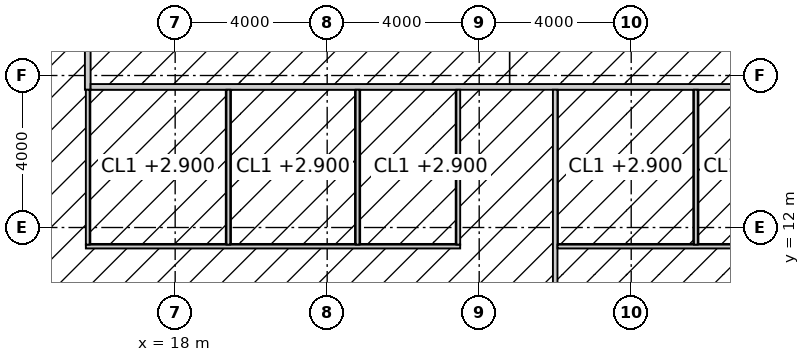
"""IFC4 building model, lengths in metres.
Left out: names, types, materials, properties, quantities, classifications, styles, units other than length and angle.
Written with IfcOpenShell. Run it as: python <this file> out.ifc"""

import sys

from ifc_helpers import new_model, si_unit, direction, frame, frame_2d, origin, place, context, subcontext, project, spatial, rectangle, extrude, element, fill, save


model = new_model("IFC4")
c1 = context("Model", 3, precision=1e-05, world=origin(), true_north=direction((0.0, 1.0)))
c2 = subcontext(c1, "Body", "Model", "MODEL_VIEW")
j1 = project(units=[si_unit("LENGTHUNIT", "METRE"), si_unit("PLANEANGLEUNIT", "RADIAN")], contexts=[c1])
p1 = place(None, origin())
s1 = spatial("IfcSite", under=j1, at=p1, CompositionType="ELEMENT")
p2 = place(p1, origin())
s2 = spatial("IfcBuilding", under=s1, at=p2, CompositionType="ELEMENT")
p3 = place(p2, frame((0.0, 0.0, 93.4)))
s3 = spatial("IfcBuildingStorey", under=s2, at=p3, CompositionType="ELEMENT", Elevation=93.4)
p4 = place(p3, frame((15.7, 15.625, 0.0), z_axis=(0.0, 0.0, 1.0), x_axis=(0.0, 1.0, 0.0)))
e1 = element("IfcWall", 1, at=p4, inside=s3, PredefinedType="PARTITIONING", context=c2, shape_type="SweptSolid", body=[
    extrude(rectangle(XDim=22.75, YDim=0.15, at=frame_2d((11.375, 0.0))), origin(), (0.0, 0.0, 1.0), 3.85),
])
p5 = place(p4, frame((10.475, 0.0, 0.0)))
e2 = element("IfcOpeningElement", 2, at=p5, cuts=e1, PredefinedType="OPENING", context=c2, shape_type="SweptSolid", body=[
    extrude(rectangle(XDim=1.8, YDim=2.4, at=frame_2d((0.9, 1.2))), frame((0.0, 0.085, 0.0), z_axis=(0.0, -1.0, 0.0), x_axis=(1.0, 0.0, 0.0)), (0.0, 0.0, 1.0), 0.17),
])
p6 = place(p3, frame((15.775, 15.7, 0.0), z_axis=(0.0, 0.0, 1.0), x_axis=(1.0, 0.0, 0.0)))
e3 = element("IfcWall", 3, at=p6, inside=s3, PredefinedType="PARTITIONING", context=c2, shape_type="SweptSolid", body=[
    extrude(rectangle(XDim=22.05, YDim=0.15, at=frame_2d((11.025, 0.0))), origin(), (0.0, 0.0, 1.0), 3.85),
])
p7 = place(p3, frame((28.0, 0.3, 0.0), z_axis=(0.0, 0.0, 1.0), x_axis=(0.0, 1.0, 0.0)))
e4 = element("IfcWall", 4, at=p7, inside=s3, PredefinedType="PARTITIONING", context=c2, shape_type="SweptSolid", body=[
    extrude(rectangle(XDim=15.325, YDim=0.12, at=frame_2d((7.663, 0.0))), origin(), (0.0, 0.0, 1.0), 3.85),
])
p8 = place(p3, frame((15.65, 11.5, 0.0), z_axis=(0.0, 0.0, 1.0), x_axis=(1.0, 0.0, 0.0)))
e5 = element("IfcWall", 5, at=p8, inside=s3, PredefinedType="PARTITIONING", context=c2, shape_type="SweptSolid", body=[
    extrude(rectangle(XDim=9.85, YDim=0.1, at=frame_2d((4.925, 0.0))), origin(), (0.0, 0.0, 1.0), 3.85),
])
p9 = place(p8, frame((1.4, 0.0, 0.0)))
e6 = element("IfcOpeningElement", 6, at=p9, cuts=e5, PredefinedType="OPENING", context=c2, shape_type="SweptSolid", body=[
    extrude(rectangle(XDim=1.0, YDim=2.2, at=frame_2d((0.5, 1.1))), frame((0.0, 0.06, 0.0), z_axis=(0.0, -1.0, 0.0), x_axis=(1.0, 0.0, 0.0)), (0.0, 0.0, 1.0), 0.12),
])
p10 = place(p8, frame((4.95, 0.0, 0.0)))
e7 = element("IfcOpeningElement", 7, at=p10, cuts=e5, PredefinedType="OPENING", context=c2, shape_type="SweptSolid", body=[
    extrude(rectangle(XDim=1.0, YDim=2.2, at=frame_2d((0.5, 1.1))), frame((0.0, 0.06, 0.0), z_axis=(0.0, -1.0, 0.0), x_axis=(1.0, 0.0, 0.0)), (0.0, 0.0, 1.0), 0.12),
])
p11 = place(p8, frame((7.975, 0.0, 0.0)))
e8 = element("IfcOpeningElement", 8, at=p11, cuts=e5, PredefinedType="OPENING", context=c2, shape_type="SweptSolid", body=[
    extrude(rectangle(XDim=1.0, YDim=2.2, at=frame_2d((0.5, 1.1))), frame((0.0, 0.06, 0.0), z_axis=(0.0, -1.0, 0.0), x_axis=(1.0, 0.0, 0.0)), (0.0, 0.0, 1.0), 0.12),
])
p12 = place(p3, frame((28.061, 11.5, 0.0), z_axis=(0.0, 0.0, 1.0), x_axis=(1.0, 0.0, 0.0)))
e9 = element("IfcWall", 9, at=p12, inside=s3, PredefinedType="PARTITIONING", context=c2, shape_type="SweptSolid", body=[
    extrude(rectangle(XDim=9.889, YDim=0.1, at=frame_2d((4.944, 0.0))), origin(), (0.0, 0.0, 1.0), 3.85),
])
p13 = place(p12, frame((1.29, 0.0, 0.0)))
e10 = element("IfcOpeningElement", 10, at=p13, cuts=e9, PredefinedType="OPENING", context=c2, shape_type="SweptSolid", body=[
    extrude(rectangle(XDim=1.0, YDim=2.2, at=frame_2d((0.5, 1.1))), frame((0.0, 0.06, 0.0), z_axis=(0.0, -1.0, 0.0), x_axis=(1.0, 0.0, 0.0)), (0.0, 0.0, 1.0), 0.12),
])
p14 = place(p12, frame((4.84, 0.0, 0.0)))
e11 = element("IfcOpeningElement", 11, at=p14, cuts=e9, PredefinedType="OPENING", context=c2, shape_type="SweptSolid", body=[
    extrude(rectangle(XDim=1.0, YDim=2.2, at=frame_2d((0.5, 1.1))), frame((0.0, 0.06, 0.0), z_axis=(0.0, -1.0, 0.0), x_axis=(1.0, 0.0, 0.0)), (0.0, 0.0, 1.0), 0.12),
])
p15 = place(p12, frame((7.939, 0.0, 0.0)))
e12 = element("IfcOpeningElement", 12, at=p15, cuts=e9, PredefinedType="OPENING", context=c2, shape_type="SweptSolid", body=[
    extrude(rectangle(XDim=1.0, YDim=2.2, at=frame_2d((0.5, 1.1))), frame((0.0, 0.06, 0.0), z_axis=(0.0, -1.0, 0.0), x_axis=(1.0, 0.0, 0.0)), (0.0, 0.0, 1.0), 0.12),
])
for number, where, z_axis, x_axis in (
    (13, (15.7, 11.55, 0.0), (0.0, 0.0, 1.0), (0.0, 1.0, 0.0)),
    (14, (19.4, 11.55, 0.0), (0.0, 0.0, 1.0), (0.0, 1.0, 0.0)),
    (15, (22.8, 11.55, 0.0), (0.0, 0.0, 1.0), (0.0, 1.0, 0.0)),
    (16, (25.45, 11.55, 0.0), (0.0, 0.0, 1.0), (0.0, 1.0, 0.0)),
    (17, (31.701, 11.55, 0.0), (0.0, 0.0, 1.0), (0.0, 1.0, 0.0)),
):
    element("IfcWall", number, at=place(p3, frame(where, z_axis=z_axis, x_axis=x_axis)), inside=s3, PredefinedType="PARTITIONING", context=c2, shape_type="SweptSolid", body=[
        extrude(rectangle(XDim=4.075, YDim=0.1, at=frame_2d((2.038, 0.0))), origin(), (0.0, 0.0, 1.0), 3.85),
    ])
p16 = place(p9, origin())
e18 = element("IfcDoor", 18, at=p16, inside=s3, OperationType="SINGLE_SWING_RIGHT", PredefinedType="DOOR", context=c2, shape_type="SweptSolid", body=[
    extrude(rectangle(XDim=1.0, YDim=2.2, at=frame_2d((0.5, 1.1))), frame((0.0, 0.025, 0.0), z_axis=(0.0, -1.0, 0.0), x_axis=(1.0, 0.0, 0.0)), (0.0, 0.0, 1.0), 0.05),
])
fill(e6, e18)
p17 = place(p10, origin())
e19 = element("IfcDoor", 19, at=p17, inside=s3, OperationType="SINGLE_SWING_LEFT", PredefinedType="DOOR", context=c2, shape_type="SweptSolid", body=[
    extrude(rectangle(XDim=1.0, YDim=2.2, at=frame_2d((0.5, 1.1))), frame((0.0, 0.025, 0.0), z_axis=(0.0, -1.0, 0.0), x_axis=(1.0, 0.0, 0.0)), (0.0, 0.0, 1.0), 0.05),
])
fill(e7, e19)
p18 = place(p11, origin())
e20 = element("IfcDoor", 20, at=p18, inside=s3, OperationType="SINGLE_SWING_LEFT", PredefinedType="DOOR", context=c2, shape_type="SweptSolid", body=[
    extrude(rectangle(XDim=1.0, YDim=2.2, at=frame_2d((0.5, 1.1))), frame((0.0, 0.025, 0.0), z_axis=(0.0, -1.0, 0.0), x_axis=(1.0, 0.0, 0.0)), (0.0, 0.0, 1.0), 0.05),
])
fill(e8, e20)
p19 = place(p13, origin())
e21 = element("IfcDoor", 21, at=p19, inside=s3, OperationType="SINGLE_SWING_RIGHT", PredefinedType="DOOR", context=c2, shape_type="SweptSolid", body=[
    extrude(rectangle(XDim=1.0, YDim=2.2, at=frame_2d((0.5, 1.1))), frame((0.0, 0.025, 0.0), z_axis=(0.0, -1.0, 0.0), x_axis=(1.0, 0.0, 0.0)), (0.0, 0.0, 1.0), 0.05),
])
fill(e10, e21)
save(model, sys.argv[1])
